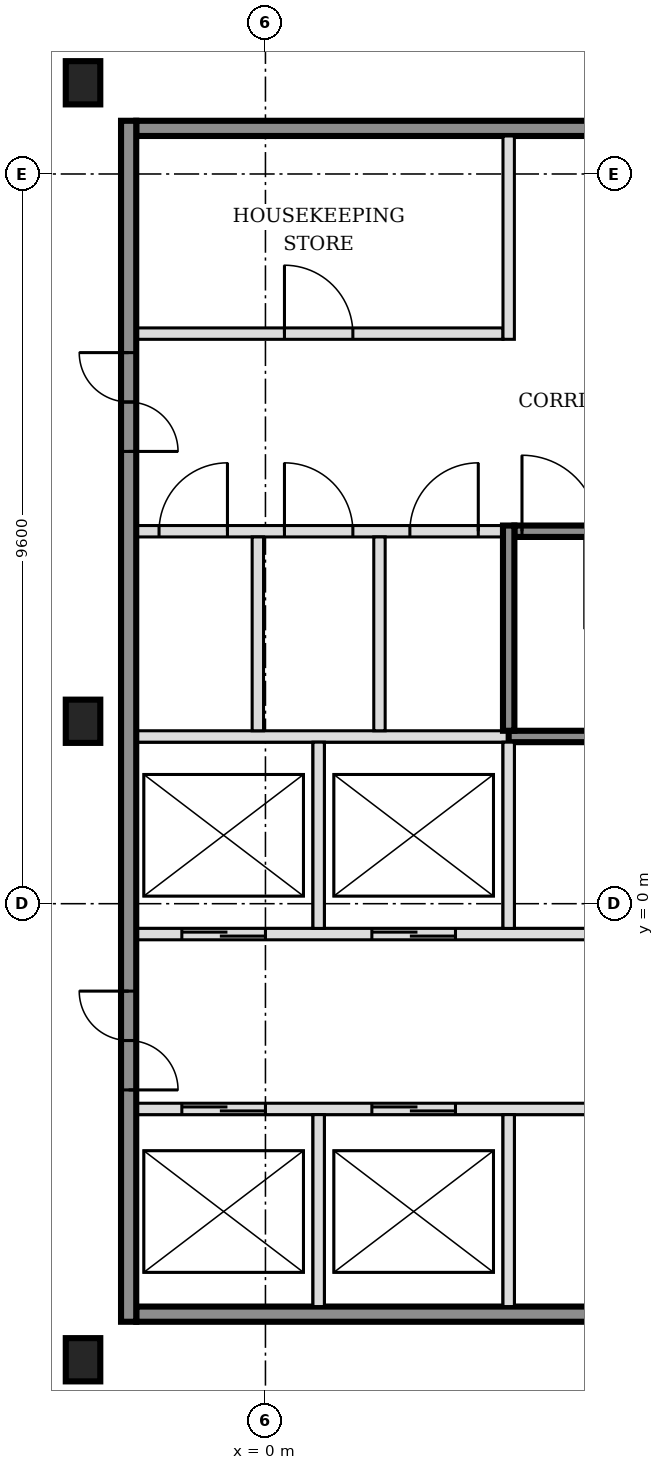
"""IFC4 building model, lengths in metres.
Left out: names, types, materials, properties, quantities, classifications, styles, units other than length and angle.
Written with IfcOpenShell. Run it as: python <this file> out.ifc"""

import sys

from ifc_helpers import new_model, si_unit, direction, frame, frame_2d, origin, origin_2d, place, context, subcontext, project, spatial, rectangle, i_section, extrude, element, fill, save


model = new_model("IFC4")
c1 = context("Model", 3, precision=1e-05, world=origin(), true_north=direction((0.0, 1.0)))
c2 = subcontext(c1, "Body", "Model", "MODEL_VIEW")
j1 = project(units=[si_unit("LENGTHUNIT", "METRE"), si_unit("PLANEANGLEUNIT", "RADIAN")], contexts=[c1])
p1 = place(None, origin())
s1 = spatial("IfcSite", under=j1, at=p1, CompositionType="ELEMENT")
p2 = place(p1, origin())
s2 = spatial("IfcBuilding", under=s1, at=p2, CompositionType="ELEMENT")
p3 = place(p2, frame((0.0, 0.0, 61.8)))
s3 = spatial("IfcBuildingStorey", under=s2, at=p3, CompositionType="ELEMENT", Elevation=61.8)
for number, where, z_axis, x_axis in (
    (1, (-2.4, -6.0, -0.15), (0.0, 0.0, 1.0), (1.0, 0.0, 0.0)),
    (2, (-2.4, 2.4, -0.15), (0.0, 0.0, 1.0), (1.0, 0.0, 0.0)),
    (3, (-2.4, 10.8, -0.15), (0.0, 0.0, 1.0), (1.0, 0.0, 0.0)),
):
    element("IfcColumn", number, at=place(p3, frame(where, z_axis=z_axis, x_axis=x_axis)), inside=s3, PredefinedType="COLUMN", context=c2, shape_type="SweptSolid", body=[
        extrude(i_section(OverallWidth=0.454, OverallDepth=0.569, WebThickness=0.078, FlangeThickness=0.125, FilletRadius=0.015, at=origin_2d()), origin(), (0.0, 0.0, 1.0), 3.6),
    ])
p4 = place(p3, frame((-1.7, -5.4, 0.0), z_axis=(0.0, 0.0, 1.0), x_axis=(1.0, 0.0, 0.0)))
e4 = element("IfcWall", 4, at=p4, inside=s3, PredefinedType="SOLIDWALL", context=c2, shape_type="SweptSolid", body=[
    extrude(rectangle(XDim=7.9, YDim=0.2, at=frame_2d((3.95, 0.0))), origin(), (0.0, 0.0, 1.0), 3.45),
])
p5 = place(p3, frame((-1.7, -2.7, 0.0), z_axis=(0.0, 0.0, 1.0), x_axis=(1.0, 0.0, 0.0)))
e5 = element("IfcWall", 5, at=p5, inside=s3, PredefinedType="SOLIDWALL", context=c2, shape_type="SweptSolid", body=[
    extrude(rectangle(XDim=7.9, YDim=0.15, at=frame_2d((3.95, 0.0))), origin(), (0.0, 0.0, 1.0), 3.45),
])
p6 = place(p5, frame((0.6, 0.0, 0.0)))
e6 = element("IfcOpeningElement", 6, at=p6, cuts=e5, PredefinedType="OPENING", context=c2, shape_type="SweptSolid", body=[
    extrude(rectangle(XDim=1.1, YDim=2.1, at=frame_2d((0.55, 1.05))), frame((0.0, 0.085, 0.0), z_axis=(0.0, -1.0, 0.0), x_axis=(1.0, 0.0, 0.0)), (0.0, 0.0, 1.0), 0.17),
])
p7 = place(p5, frame((3.1, 0.0, 0.0)))
e7 = element("IfcOpeningElement", 7, at=p7, cuts=e5, PredefinedType="OPENING", context=c2, shape_type="SweptSolid", body=[
    extrude(rectangle(XDim=1.1, YDim=2.1, at=frame_2d((0.55, 1.05))), frame((0.0, 0.085, 0.0), z_axis=(0.0, -1.0, 0.0), x_axis=(1.0, 0.0, 0.0)), (0.0, 0.0, 1.0), 0.17),
])
p8 = place(p3, frame((-1.7, -0.4, 0.0), z_axis=(0.0, 0.0, 1.0), x_axis=(1.0, 0.0, 0.0)))
e8 = element("IfcWall", 8, at=p8, inside=s3, PredefinedType="SOLIDWALL", context=c2, shape_type="SweptSolid", body=[
    extrude(rectangle(XDim=15.925, YDim=0.15, at=frame_2d((7.962, 0.0))), origin(), (0.0, 0.0, 1.0), 3.45),
])
p9 = place(p8, frame((0.6, 0.0, 0.0)))
e9 = element("IfcOpeningElement", 9, at=p9, cuts=e8, PredefinedType="OPENING", context=c2, shape_type="SweptSolid", body=[
    extrude(rectangle(XDim=1.1, YDim=2.1, at=frame_2d((0.55, 1.05))), frame((0.0, 0.085, 0.0), z_axis=(0.0, -1.0, 0.0), x_axis=(1.0, 0.0, 0.0)), (0.0, 0.0, 1.0), 0.17),
])
p10 = place(p8, frame((3.1, 0.0, 0.0)))
e10 = element("IfcOpeningElement", 10, at=p10, cuts=e8, PredefinedType="OPENING", context=c2, shape_type="SweptSolid", body=[
    extrude(rectangle(XDim=1.1, YDim=2.1, at=frame_2d((0.55, 1.05))), frame((0.0, 0.085, 0.0), z_axis=(0.0, -1.0, 0.0), x_axis=(1.0, 0.0, 0.0)), (0.0, 0.0, 1.0), 0.17),
])
p11 = place(p8, frame((11.575, 0.0, 0.0)))
e11 = element("IfcOpeningElement", 11, at=p11, cuts=e8, PredefinedType="OPENING", context=c2, shape_type="SweptSolid", body=[
    extrude(rectangle(XDim=1.2, YDim=2.1, at=frame_2d((0.6, 1.05))), frame((0.0, 0.085, 0.0), z_axis=(0.0, -1.0, 0.0), x_axis=(1.0, 0.0, 0.0)), (0.0, 0.0, 1.0), 0.17),
])
p12 = place(p8, frame((14.125, 0.0, 0.0)))
e12 = element("IfcOpeningElement", 12, at=p12, cuts=e8, PredefinedType="OPENING", context=c2, shape_type="SweptSolid", body=[
    extrude(rectangle(XDim=1.2, YDim=2.1, at=frame_2d((0.6, 1.05))), frame((0.0, 0.085, 0.0), z_axis=(0.0, -1.0, 0.0), x_axis=(1.0, 0.0, 0.0)), (0.0, 0.0, 1.0), 0.17),
])
p13 = place(p3, frame((-1.7, 2.2, 0.0), z_axis=(0.0, 0.0, 1.0), x_axis=(1.0, 0.0, 0.0)))
e13 = element("IfcWall", 13, at=p13, inside=s3, PredefinedType="SOLIDWALL", context=c2, shape_type="SweptSolid", body=[
    extrude(rectangle(XDim=4.9, YDim=0.15, at=frame_2d((2.45, 0.0))), origin(), (0.0, 0.0, 1.0), 3.45),
])
p14 = place(p3, frame((3.2, 2.2, 0.0), z_axis=(0.0, 0.0, 1.0), x_axis=(1.0, 0.0, 0.0)))
e14 = element("IfcWall", 14, at=p14, inside=s3, PredefinedType="SOLIDWALL", context=c2, shape_type="SweptSolid", body=[
    extrude(rectangle(XDim=6.5, YDim=0.15, at=frame_2d((3.25, 0.0))), origin(), (0.0, 0.0, 1.0), 3.45),
])
p15 = place(p3, frame((-1.7, 4.9, 0.0), z_axis=(0.0, 0.0, 1.0), x_axis=(1.0, 0.0, 0.0)))
e15 = element("IfcWall", 15, at=p15, inside=s3, PredefinedType="PARTITIONING", context=c2, shape_type="SweptSolid", body=[
    extrude(rectangle(XDim=4.825, YDim=0.15, at=frame_2d((2.413, 0.0))), origin(), (0.0, 0.0, 1.0), 3.45),
])
p16 = place(p15, frame((0.3, 0.0, 0.0)))
e16 = element("IfcOpeningElement", 16, at=p16, cuts=e15, PredefinedType="OPENING", context=c2, shape_type="SweptSolid", body=[
    extrude(rectangle(XDim=0.9, YDim=2.1, at=frame_2d((0.45, 1.05))), frame((0.0, 0.085, 0.0), z_axis=(0.0, -1.0, 0.0), x_axis=(1.0, 0.0, 0.0)), (0.0, 0.0, 1.0), 0.17),
])
p17 = place(p15, frame((1.95, 0.0, 0.0)))
e17 = element("IfcOpeningElement", 17, at=p17, cuts=e15, PredefinedType="OPENING", context=c2, shape_type="SweptSolid", body=[
    extrude(rectangle(XDim=0.9, YDim=2.1, at=frame_2d((0.45, 1.05))), frame((0.0, 0.085, 0.0), z_axis=(0.0, -1.0, 0.0), x_axis=(1.0, 0.0, 0.0)), (0.0, 0.0, 1.0), 0.17),
])
p18 = place(p15, frame((3.6, 0.0, 0.0)))
e18 = element("IfcOpeningElement", 18, at=p18, cuts=e15, PredefinedType="OPENING", context=c2, shape_type="SweptSolid", body=[
    extrude(rectangle(XDim=0.9, YDim=2.1, at=frame_2d((0.45, 1.05))), frame((0.0, 0.085, 0.0), z_axis=(0.0, -1.0, 0.0), x_axis=(1.0, 0.0, 0.0)), (0.0, 0.0, 1.0), 0.17),
])
p19 = place(p3, frame((3.275, 4.9, 0.0), z_axis=(0.0, 0.0, 1.0), x_axis=(1.0, 0.0, 0.0)))
e19 = element("IfcWall", 19, at=p19, inside=s3, PredefinedType="SOLIDWALL", context=c2, shape_type="SweptSolid", body=[
    extrude(rectangle(XDim=6.425, YDim=0.15, at=frame_2d((3.212, 0.0))), origin(), (0.0, 0.0, 1.0), 3.45),
])
p20 = place(p19, frame((0.1, 0.0, 0.0)))
e20 = element("IfcOpeningElement", 20, at=p20, cuts=e19, PredefinedType="OPENING", context=c2, shape_type="SweptSolid", body=[
    extrude(rectangle(XDim=1.0, YDim=2.1, at=frame_2d((0.5, 1.05))), frame((0.0, 0.085, 0.0), z_axis=(0.0, -1.0, 0.0), x_axis=(1.0, 0.0, 0.0)), (0.0, 0.0, 1.0), 0.17),
])
p21 = place(p3, frame((-1.7, 7.5, 0.0), z_axis=(0.0, 0.0, 1.0), x_axis=(1.0, 0.0, 0.0)))
e21 = element("IfcWall", 21, at=p21, inside=s3, PredefinedType="PARTITIONING", context=c2, shape_type="SweptSolid", body=[
    extrude(rectangle(XDim=4.825, YDim=0.15, at=frame_2d((2.413, 0.0))), origin(), (0.0, 0.0, 1.0), 3.45),
])
p22 = place(p21, frame((1.95, 0.0, 0.0)))
e22 = element("IfcOpeningElement", 22, at=p22, cuts=e21, PredefinedType="OPENING", context=c2, shape_type="SweptSolid", body=[
    extrude(rectangle(XDim=0.9, YDim=2.1, at=frame_2d((0.45, 1.05))), frame((0.0, 0.085, 0.0), z_axis=(0.0, -1.0, 0.0), x_axis=(1.0, 0.0, 0.0)), (0.0, 0.0, 1.0), 0.17),
])
p23 = place(p3, frame((-1.7, 10.2, 0.0), z_axis=(0.0, 0.0, 1.0), x_axis=(1.0, 0.0, 0.0)))
e23 = element("IfcWall", 23, at=p23, inside=s3, PredefinedType="SOLIDWALL", context=c2, shape_type="SweptSolid", body=[
    extrude(rectangle(XDim=7.9, YDim=0.2, at=frame_2d((3.95, 0.0))), origin(), (0.0, 0.0, 1.0), 3.45),
])
p24 = place(p3, frame((-1.8, -5.5, 0.0), z_axis=(0.0, 0.0, 1.0), x_axis=(0.0, 1.0, 0.0)))
e24 = element("IfcWall", 24, at=p24, inside=s3, PredefinedType="SOLIDWALL", context=c2, shape_type="SweptSolid", body=[
    extrude(rectangle(XDim=15.8, YDim=0.2, at=frame_2d((7.9, 0.0))), origin(), (0.0, 0.0, 1.0), 3.45),
])
p25 = place(p24, frame((3.05, 0.0, 0.0)))
e25 = element("IfcOpeningElement", 25, at=p25, cuts=e24, PredefinedType="OPENING", context=c2, shape_type="SweptSolid", body=[
    extrude(rectangle(XDim=1.3, YDim=2.1, at=frame_2d((0.65, 1.05))), frame((0.0, 0.11, 0.0), z_axis=(0.0, -1.0, 0.0), x_axis=(1.0, 0.0, 0.0)), (0.0, 0.0, 1.0), 0.22),
])
p26 = place(p24, frame((11.45, 0.0, 0.0)))
e26 = element("IfcOpeningElement", 26, at=p26, cuts=e24, PredefinedType="OPENING", context=c2, shape_type="SweptSolid", body=[
    extrude(rectangle(XDim=1.3, YDim=2.1, at=frame_2d((0.65, 1.05))), frame((0.0, 0.11, 0.0), z_axis=(0.0, -1.0, 0.0), x_axis=(1.0, 0.0, 0.0)), (0.0, 0.0, 1.0), 0.22),
])
p27 = place(p3, frame((-0.1, 2.275, 0.0), z_axis=(0.0, 0.0, 1.0), x_axis=(0.0, 1.0, 0.0)))
e27 = element("IfcWall", 27, at=p27, inside=s3, PredefinedType="PARTITIONING", context=c2, shape_type="SweptSolid", body=[
    extrude(rectangle(XDim=2.55, YDim=0.15, at=frame_2d((1.275, 0.0))), origin(), (0.0, 0.0, 1.0), 3.45),
])
p28 = place(p3, frame((0.7, -5.3, 0.0), z_axis=(0.0, 0.0, 1.0), x_axis=(0.0, 1.0, 0.0)))
e28 = element("IfcWall", 28, at=p28, inside=s3, PredefinedType="SOLIDWALL", context=c2, shape_type="SweptSolid", body=[
    extrude(rectangle(XDim=2.525, YDim=0.15, at=frame_2d((1.263, 0.0))), origin(), (0.0, 0.0, 1.0), 3.45),
])
p29 = place(p3, frame((0.7, -0.325, 0.0), z_axis=(0.0, 0.0, 1.0), x_axis=(0.0, 1.0, 0.0)))
e29 = element("IfcWall", 29, at=p29, inside=s3, PredefinedType="SOLIDWALL", context=c2, shape_type="SweptSolid", body=[
    extrude(rectangle(XDim=2.45, YDim=0.15, at=frame_2d((1.225, 0.0))), origin(), (0.0, 0.0, 1.0), 3.45),
])
p30 = place(p3, frame((1.5, 2.275, 0.0), z_axis=(0.0, 0.0, 1.0), x_axis=(0.0, 1.0, 0.0)))
e30 = element("IfcWall", 30, at=p30, inside=s3, PredefinedType="PARTITIONING", context=c2, shape_type="SweptSolid", body=[
    extrude(rectangle(XDim=2.55, YDim=0.15, at=frame_2d((1.275, 0.0))), origin(), (0.0, 0.0, 1.0), 3.45),
])
p31 = place(p3, frame((3.2, -5.3, 0.0), z_axis=(0.0, 0.0, 1.0), x_axis=(0.0, 1.0, 0.0)))
e31 = element("IfcWall", 31, at=p31, inside=s3, PredefinedType="SOLIDWALL", context=c2, shape_type="SweptSolid", body=[
    extrude(rectangle(XDim=2.525, YDim=0.15, at=frame_2d((1.263, 0.0))), origin(), (0.0, 0.0, 1.0), 3.45),
])
p32 = place(p3, frame((3.2, -0.325, 0.0), z_axis=(0.0, 0.0, 1.0), x_axis=(0.0, 1.0, 0.0)))
e32 = element("IfcWall", 32, at=p32, inside=s3, PredefinedType="SOLIDWALL", context=c2, shape_type="SweptSolid", body=[
    extrude(rectangle(XDim=2.45, YDim=0.15, at=frame_2d((1.225, 0.0))), origin(), (0.0, 0.0, 1.0), 3.45),
])
p33 = place(p3, frame((3.2, 2.275, 0.0), z_axis=(0.0, 0.0, 1.0), x_axis=(0.0, 1.0, 0.0)))
e33 = element("IfcWall", 33, at=p33, inside=s3, PredefinedType="SOLIDWALL", context=c2, shape_type="SweptSolid", body=[
    extrude(rectangle(XDim=2.7, YDim=0.15, at=frame_2d((1.35, 0.0))), origin(), (0.0, 0.0, 1.0), 3.45),
])
p34 = place(p3, frame((3.2, 7.425, 0.0), z_axis=(0.0, 0.0, 1.0), x_axis=(0.0, 1.0, 0.0)))
e34 = element("IfcWall", 34, at=p34, inside=s3, PredefinedType="PARTITIONING", context=c2, shape_type="SweptSolid", body=[
    extrude(rectangle(XDim=2.675, YDim=0.15, at=frame_2d((1.337, 0.0))), origin(), (0.0, 0.0, 1.0), 3.45),
])
p35 = place(p6, origin())
e35 = element("IfcDoor", 35, at=p35, inside=s3, OperationType="DOUBLE_DOOR_SLIDING", PredefinedType="DOOR", context=c2, shape_type="SweptSolid", body=[
    extrude(rectangle(XDim=1.1, YDim=2.1, at=frame_2d((0.55, 1.05))), frame((0.0, 0.025, 0.0), z_axis=(0.0, -1.0, 0.0), x_axis=(1.0, 0.0, 0.0)), (0.0, 0.0, 1.0), 0.05),
])
fill(e6, e35)
p36 = place(p7, origin())
e36 = element("IfcDoor", 36, at=p36, inside=s3, OperationType="DOUBLE_DOOR_SLIDING", PredefinedType="DOOR", context=c2, shape_type="SweptSolid", body=[
    extrude(rectangle(XDim=1.1, YDim=2.1, at=frame_2d((0.55, 1.05))), frame((0.0, 0.025, 0.0), z_axis=(0.0, -1.0, 0.0), x_axis=(1.0, 0.0, 0.0)), (0.0, 0.0, 1.0), 0.05),
])
fill(e7, e36)
p37 = place(p9, origin())
e37 = element("IfcDoor", 37, at=p37, inside=s3, OperationType="DOUBLE_DOOR_SLIDING", PredefinedType="DOOR", context=c2, shape_type="SweptSolid", body=[
    extrude(rectangle(XDim=1.1, YDim=2.1, at=frame_2d((0.55, 1.05))), frame((0.0, 0.025, 0.0), z_axis=(0.0, -1.0, 0.0), x_axis=(1.0, 0.0, 0.0)), (0.0, 0.0, 1.0), 0.05),
])
fill(e9, e37)
p38 = place(p10, origin())
e38 = element("IfcDoor", 38, at=p38, inside=s3, OperationType="DOUBLE_DOOR_SLIDING", PredefinedType="DOOR", context=c2, shape_type="SweptSolid", body=[
    extrude(rectangle(XDim=1.1, YDim=2.1, at=frame_2d((0.55, 1.05))), frame((0.0, 0.025, 0.0), z_axis=(0.0, -1.0, 0.0), x_axis=(1.0, 0.0, 0.0)), (0.0, 0.0, 1.0), 0.05),
])
fill(e10, e38)
p39 = place(p20, origin())
e39 = element("IfcDoor", 39, at=p39, inside=s3, OperationType="SINGLE_SWING_LEFT", PredefinedType="DOOR", context=c2, shape_type="SweptSolid", body=[
    extrude(rectangle(XDim=1.0, YDim=2.1, at=frame_2d((0.5, 1.05))), frame((0.0, 0.025, 0.0), z_axis=(0.0, -1.0, 0.0), x_axis=(1.0, 0.0, 0.0)), (0.0, 0.0, 1.0), 0.05),
])
fill(e20, e39)
p40 = place(p25, origin())
e40 = element("IfcDoor", 40, at=p40, inside=s3, OperationType="DOUBLE_DOOR_SINGLE_SWING", PredefinedType="DOOR", context=c2, shape_type="SweptSolid", body=[
    extrude(rectangle(XDim=1.3, YDim=2.1, at=frame_2d((0.65, 1.05))), frame((0.0, 0.025, 0.0), z_axis=(0.0, -1.0, 0.0), x_axis=(1.0, 0.0, 0.0)), (0.0, 0.0, 1.0), 0.05),
])
fill(e25, e40)
p41 = place(p26, origin())
e41 = element("IfcDoor", 41, at=p41, inside=s3, OperationType="DOUBLE_DOOR_SINGLE_SWING", PredefinedType="DOOR", context=c2, shape_type="SweptSolid", body=[
    extrude(rectangle(XDim=1.3, YDim=2.1, at=frame_2d((0.65, 1.05))), frame((0.0, 0.025, 0.0), z_axis=(0.0, -1.0, 0.0), x_axis=(1.0, 0.0, 0.0)), (0.0, 0.0, 1.0), 0.05),
])
fill(e26, e41)
p42 = place(p16, origin())
e42 = element("IfcDoor", 42, at=p42, inside=s3, OperationType="SINGLE_SWING_RIGHT", PredefinedType="DOOR", context=c2, shape_type="SweptSolid", body=[
    extrude(rectangle(XDim=0.9, YDim=2.1, at=frame_2d((0.45, 1.05))), frame((0.0, 0.025, 0.0), z_axis=(0.0, -1.0, 0.0), x_axis=(1.0, 0.0, 0.0)), (0.0, 0.0, 1.0), 0.05),
])
fill(e16, e42)
p43 = place(p17, origin())
e43 = element("IfcDoor", 43, at=p43, inside=s3, OperationType="SINGLE_SWING_LEFT", PredefinedType="DOOR", context=c2, shape_type="SweptSolid", body=[
    extrude(rectangle(XDim=0.9, YDim=2.1, at=frame_2d((0.45, 1.05))), frame((0.0, 0.025, 0.0), z_axis=(0.0, -1.0, 0.0), x_axis=(1.0, 0.0, 0.0)), (0.0, 0.0, 1.0), 0.05),
])
fill(e17, e43)
p44 = place(p18, origin())
e44 = element("IfcDoor", 44, at=p44, inside=s3, OperationType="SINGLE_SWING_RIGHT", PredefinedType="DOOR", context=c2, shape_type="SweptSolid", body=[
    extrude(rectangle(XDim=0.9, YDim=2.1, at=frame_2d((0.45, 1.05))), frame((0.0, 0.025, 0.0), z_axis=(0.0, -1.0, 0.0), x_axis=(1.0, 0.0, 0.0)), (0.0, 0.0, 1.0), 0.05),
])
fill(e18, e44)
p45 = place(p22, origin())
e45 = element("IfcDoor", 45, at=p45, inside=s3, OperationType="SINGLE_SWING_LEFT", PredefinedType="DOOR", context=c2, shape_type="SweptSolid", body=[
    extrude(rectangle(XDim=0.9, YDim=2.1, at=frame_2d((0.45, 1.05))), frame((0.0, 0.025, 0.0), z_axis=(0.0, -1.0, 0.0), x_axis=(1.0, 0.0, 0.0)), (0.0, 0.0, 1.0), 0.05),
])
fill(e22, e45)
save(model, sys.argv[1])
